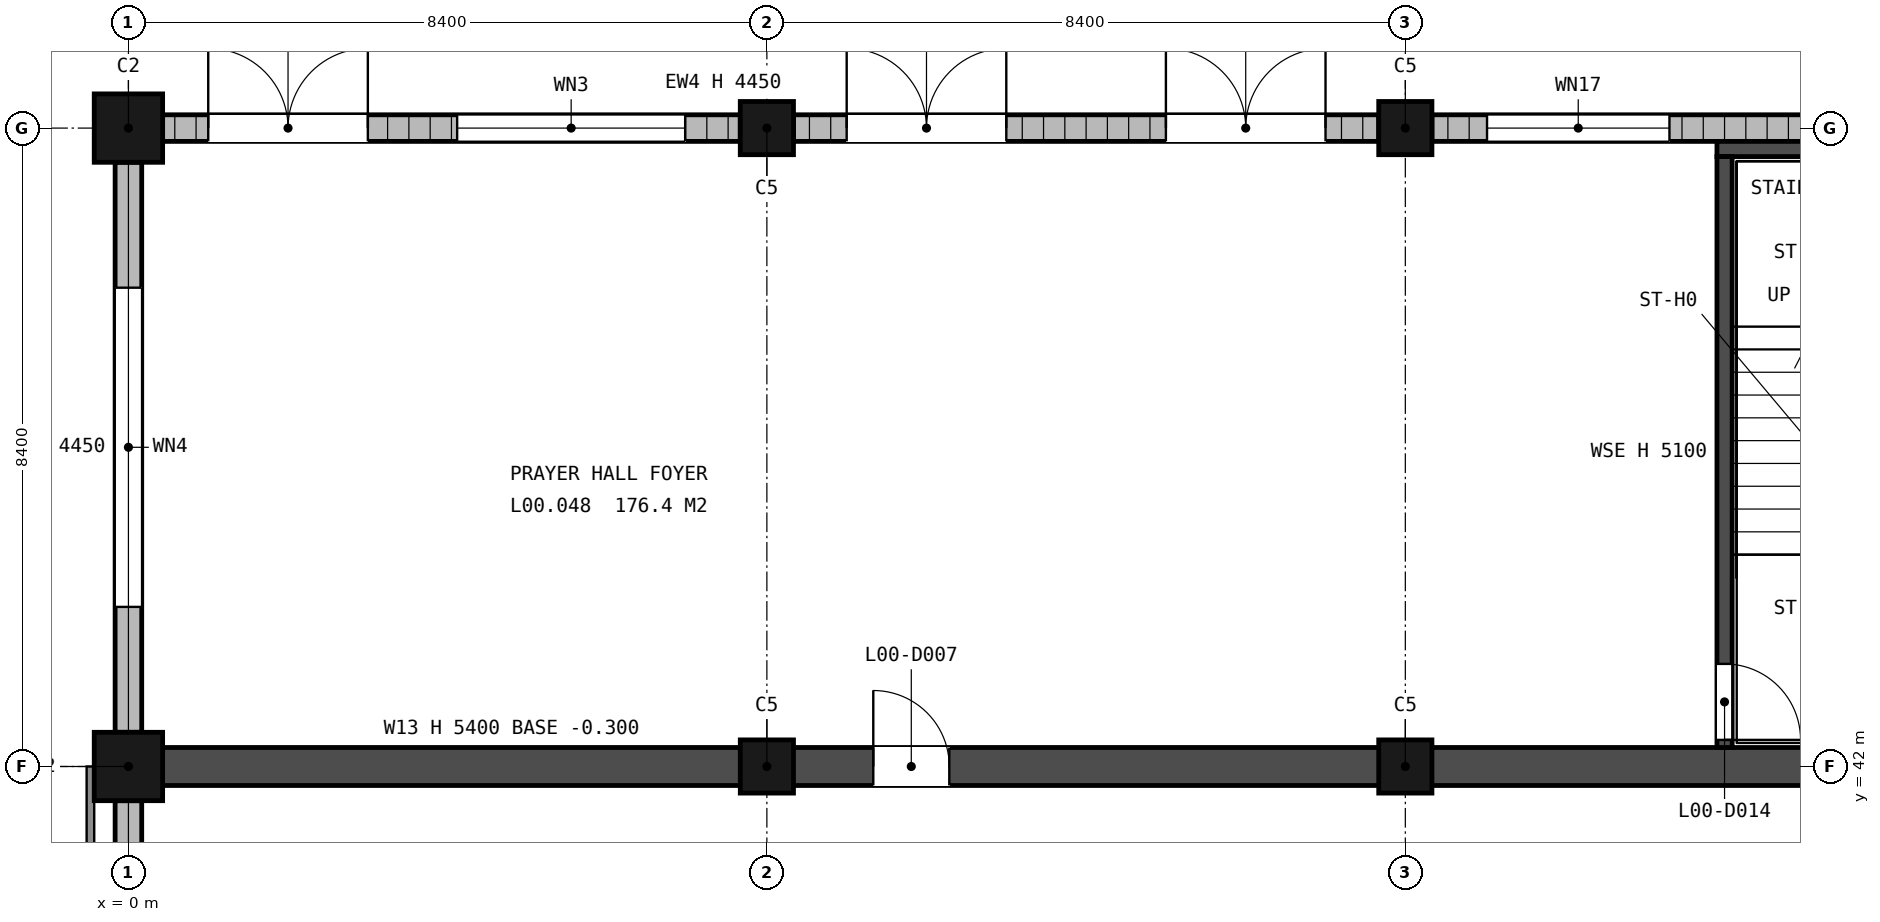
"""IFC4 building model, lengths in metres.
Left out: names, types, materials, properties, quantities, classifications, styles, units other than length and angle.
Written with IfcOpenShell. Run it as: python <this file> out.ifc"""

import sys

from ifc_helpers import new_model, si_unit, direction, frame, frame_2d, origin, origin_2d, place, context, subcontext, project, spatial, rectangle, extrude, element, fill, save


model = new_model("IFC4")
c1 = context("Model", 3, precision=1e-05, world=origin(), true_north=direction((0.0, 1.0)))
c2 = subcontext(c1, "Body", "Model", "MODEL_VIEW")
j1 = project(units=[si_unit("LENGTHUNIT", "METRE"), si_unit("PLANEANGLEUNIT", "RADIAN")], contexts=[c1])
p1 = place(None, origin())
s1 = spatial("IfcSite", under=j1, at=p1, CompositionType="ELEMENT")
p2 = place(p1, origin())
s2 = spatial("IfcBuilding", under=s1, at=p2, CompositionType="ELEMENT")
p3 = place(p2, origin())
s3 = spatial("IfcBuildingStorey", under=s2, at=p3, CompositionType="ELEMENT", Elevation=0.0)
for number, where, z_axis, x_axis in (
    (1, (0.0, 42.0, -0.3), (0.0, 0.0, 1.0), (1.0, 0.0, 0.0)),
    (2, (0.0, 50.4, -0.3), (0.0, 0.0, 1.0), (1.0, 0.0, 0.0)),
):
    element("IfcColumn", number, at=place(p3, frame(where, z_axis=z_axis, x_axis=x_axis)), inside=s3, PredefinedType="COLUMN", context=c2, shape_type="SweptSolid", body=[
        extrude(rectangle(XDim=0.9, YDim=0.9, at=origin_2d()), origin(), (0.0, 0.0, 1.0), 5.4),
    ])
for number, where, z_axis, x_axis in (
    (3, (8.4, 42.0, -0.3), (0.0, 0.0, 1.0), (1.0, 0.0, 0.0)),
    (4, (8.4, 50.4, -0.3), (0.0, 0.0, 1.0), (1.0, 0.0, 0.0)),
    (5, (16.8, 42.0, -0.3), (0.0, 0.0, 1.0), (1.0, 0.0, 0.0)),
    (6, (16.8, 50.4, -0.3), (0.0, 0.0, 1.0), (1.0, 0.0, 0.0)),
):
    element("IfcColumn", number, at=place(p3, frame(where, z_axis=z_axis, x_axis=x_axis)), inside=s3, PredefinedType="COLUMN", context=c2, shape_type="SweptSolid", body=[
        extrude(rectangle(XDim=0.7, YDim=0.7, at=origin_2d()), origin(), (0.0, 0.0, 1.0), 5.4),
    ])
p4 = place(p3, frame((0.0, 42.0, -0.3), z_axis=(0.0, 0.0, 1.0), x_axis=(1.0, 0.0, 0.0)))
e7 = element("IfcWall", 7, at=p4, inside=s3, PredefinedType="SHEAR", context=c2, shape_type="SweptSolid", body=[
    extrude(rectangle(XDim=25.2, YDim=0.5, at=frame_2d((12.6, 0.0))), origin(), (0.0, 0.0, 1.0), 5.4),
])
p5 = place(p4, frame((9.8, 0.0, 0.3)))
e8 = element("IfcOpeningElement", 8, at=p5, cuts=e7, PredefinedType="OPENING", context=c2, shape_type="SweptSolid", body=[
    extrude(rectangle(XDim=1.0, YDim=2.1, at=frame_2d((0.5, 1.05))), frame((0.0, 0.26, 0.0), z_axis=(0.0, -1.0, 0.0), x_axis=(1.0, 0.0, 0.0)), (0.0, 0.0, 1.0), 0.52),
])
p6 = place(p4, frame((22.8, 0.0, 0.3)))
e9 = element("IfcOpeningElement", 9, at=p6, cuts=e7, PredefinedType="OPENING", context=c2, shape_type="SweptSolid", body=[
    extrude(rectangle(XDim=1.0, YDim=2.1, at=frame_2d((0.5, 1.05))), frame((0.0, 0.26, 0.0), z_axis=(0.0, -1.0, 0.0), x_axis=(1.0, 0.0, 0.0)), (0.0, 0.0, 1.0), 0.52),
])
p7 = place(p3, frame((0.45, 50.4, 0.0), z_axis=(0.0, 0.0, 1.0), x_axis=(1.0, 0.0, 0.0)))
e10 = element("IfcWall", 10, at=p7, inside=s3, PredefinedType="STANDARD", context=c2, shape_type="SweptSolid", body=[
    extrude(rectangle(XDim=7.6, YDim=0.35, at=frame_2d((3.8, 0.0))), origin(), (0.0, 0.0, 1.0), 4.45),
])
p8 = place(p7, frame((0.6, 0.0, 0.0)))
e11 = element("IfcOpeningElement", 11, at=p8, cuts=e10, PredefinedType="OPENING", context=c2, shape_type="SweptSolid", body=[
    extrude(rectangle(XDim=2.1, YDim=2.2, at=frame_2d((1.05, 1.1))), frame((0.0, 0.185, 0.0), z_axis=(0.0, -1.0, 0.0), x_axis=(1.0, 0.0, 0.0)), (0.0, 0.0, 1.0), 0.37),
])
p9 = place(p7, frame((3.875, 0.0, 0.9)))
e12 = element("IfcOpeningElement", 12, at=p9, cuts=e10, PredefinedType="OPENING", context=c2, shape_type="SweptSolid", body=[
    extrude(rectangle(XDim=3.0, YDim=1.5, at=frame_2d((1.5, 0.75))), frame((0.0, 0.185, 0.0), z_axis=(0.0, -1.0, 0.0), x_axis=(1.0, 0.0, 0.0)), (0.0, 0.0, 1.0), 0.37),
])
p10 = place(p3, frame((8.75, 50.4, 0.0), z_axis=(0.0, 0.0, 1.0), x_axis=(1.0, 0.0, 0.0)))
e13 = element("IfcWall", 13, at=p10, inside=s3, PredefinedType="STANDARD", context=c2, shape_type="SweptSolid", body=[
    extrude(rectangle(XDim=7.7, YDim=0.35, at=frame_2d((3.85, 0.0))), origin(), (0.0, 0.0, 1.0), 4.45),
])
p11 = place(p10, frame((0.7, 0.0, 0.0)))
e14 = element("IfcOpeningElement", 14, at=p11, cuts=e13, PredefinedType="OPENING", context=c2, shape_type="SweptSolid", body=[
    extrude(rectangle(XDim=2.1, YDim=2.2, at=frame_2d((1.05, 1.1))), frame((0.0, 0.185, 0.0), z_axis=(0.0, -1.0, 0.0), x_axis=(1.0, 0.0, 0.0)), (0.0, 0.0, 1.0), 0.37),
])
p12 = place(p10, frame((4.9, 0.0, 0.0)))
e15 = element("IfcOpeningElement", 15, at=p12, cuts=e13, PredefinedType="OPENING", context=c2, shape_type="SweptSolid", body=[
    extrude(rectangle(XDim=2.1, YDim=2.2, at=frame_2d((1.05, 1.1))), frame((0.0, 0.185, 0.0), z_axis=(0.0, -1.0, 0.0), x_axis=(1.0, 0.0, 0.0)), (0.0, 0.0, 1.0), 0.37),
])
p13 = place(p3, frame((17.15, 50.4, 0.0), z_axis=(0.0, 0.0, 1.0), x_axis=(1.0, 0.0, 0.0)))
e16 = element("IfcWall", 16, at=p13, inside=s3, PredefinedType="STANDARD", context=c2, shape_type="SweptSolid", body=[
    extrude(rectangle(XDim=16.1, YDim=0.35, at=frame_2d((8.05, 0.0))), origin(), (0.0, 0.0, 1.0), 5.1),
])
p14 = place(p13, frame((9.1, 0.0, 0.0)))
e17 = element("IfcOpeningElement", 17, at=p14, cuts=e16, PredefinedType="OPENING", context=c2, shape_type="SweptSolid", body=[
    extrude(rectangle(XDim=2.1, YDim=2.2, at=frame_2d((1.05, 1.1))), frame((0.0, 0.185, 0.0), z_axis=(0.0, -1.0, 0.0), x_axis=(1.0, 0.0, 0.0)), (0.0, 0.0, 1.0), 0.37),
])
p15 = place(p13, frame((13.3, 0.0, 0.0)))
e18 = element("IfcOpeningElement", 18, at=p15, cuts=e16, PredefinedType="OPENING", context=c2, shape_type="SweptSolid", body=[
    extrude(rectangle(XDim=2.1, YDim=2.2, at=frame_2d((1.05, 1.1))), frame((0.0, 0.185, 0.0), z_axis=(0.0, -1.0, 0.0), x_axis=(1.0, 0.0, 0.0)), (0.0, 0.0, 1.0), 0.37),
])
p16 = place(p13, frame((0.725, 0.0, 0.9)))
e19 = element("IfcOpeningElement", 19, at=p16, cuts=e16, PredefinedType="OPENING", context=c2, shape_type="SweptSolid", body=[
    extrude(rectangle(XDim=2.4, YDim=1.5, at=frame_2d((1.2, 0.75))), frame((0.0, 0.185, 0.0), z_axis=(0.0, -1.0, 0.0), x_axis=(1.0, 0.0, 0.0)), (0.0, 0.0, 1.0), 0.37),
])
p17 = place(p3, frame((0.0, 38.15, 0.0), z_axis=(0.0, 0.0, 1.0), x_axis=(0.0, 1.0, 0.0)))
e20 = element("IfcWall", 20, at=p17, inside=s3, PredefinedType="STANDARD", context=c2, shape_type="SweptSolid", body=[
    extrude(rectangle(XDim=3.4, YDim=0.35, at=frame_2d((1.7, 0.0))), origin(), (0.0, 0.0, 1.0), 5.1),
])
p18 = place(p3, frame((0.0, 42.45, 0.0), z_axis=(0.0, 0.0, 1.0), x_axis=(0.0, 1.0, 0.0)))
e21 = element("IfcWall", 21, at=p18, inside=s3, PredefinedType="STANDARD", context=c2, shape_type="SweptSolid", body=[
    extrude(rectangle(XDim=7.5, YDim=0.35, at=frame_2d((3.75, 0.0))), origin(), (0.0, 0.0, 1.0), 4.45),
])
p19 = place(p18, frame((1.65, 0.0, 0.9)))
e22 = element("IfcOpeningElement", 22, at=p19, cuts=e21, PredefinedType="OPENING", context=c2, shape_type="SweptSolid", body=[
    extrude(rectangle(XDim=4.2, YDim=1.5, at=frame_2d((2.1, 0.75))), frame((0.0, 0.185, 0.0), z_axis=(0.0, -1.0, 0.0), x_axis=(1.0, 0.0, 0.0)), (0.0, 0.0, 1.0), 0.37),
])
p20 = place(p3, frame((20.9, 50.125, 0.0), z_axis=(0.0, 0.0, 1.0), x_axis=(1.0, 0.0, 0.0)))
e23 = element("IfcWall", 23, at=p20, inside=s3, PredefinedType="SHEAR", context=c2, shape_type="SweptSolid", body=[
    extrude(rectangle(XDim=4.4, YDim=0.2, at=frame_2d((2.2, 0.0))), origin(), (0.0, 0.0, 1.0), 5.1),
])
p21 = place(p3, frame((21.0, 42.25, 0.0), z_axis=(0.0, 0.0, 1.0), x_axis=(0.0, 1.0, 0.0)))
e24 = element("IfcWall", 24, at=p21, inside=s3, PredefinedType="SHEAR", context=c2, shape_type="SweptSolid", body=[
    extrude(rectangle(XDim=7.775, YDim=0.2, at=frame_2d((3.887, 0.0))), origin(), (0.0, 0.0, 1.0), 5.1),
])
p22 = place(p21, frame((0.1, 0.0, 0.0)))
e25 = element("IfcOpeningElement", 25, at=p22, cuts=e24, PredefinedType="OPENING", context=c2, shape_type="SweptSolid", body=[
    extrude(rectangle(XDim=1.0, YDim=2.1, at=frame_2d((0.5, 1.05))), frame((0.0, 0.11, 0.0), z_axis=(0.0, -1.0, 0.0), x_axis=(1.0, 0.0, 0.0)), (0.0, 0.0, 1.0), 0.22),
])
p23 = place(p8, origin())
e26 = element("IfcDoor", 26, at=p23, inside=s3, OperationType="SINGLE_SWING_LEFT", PredefinedType="DOOR", context=c2, shape_type="SweptSolid", body=[
    extrude(rectangle(XDim=2.1, YDim=0.013, at=frame_2d((1.05, 0.007))), frame((0.0, 0.115, 0.0), z_axis=(0.0, -1.0, 0.0), x_axis=(1.0, 0.0, 0.0)), (0.0, 0.0, 1.0), 0.23),
    extrude(rectangle(XDim=0.075, YDim=2.112, at=frame_2d((0.038, 1.069))), frame((0.0, 0.125, 0.0), z_axis=(0.0, -1.0, 0.0), x_axis=(1.0, 0.0, 0.0)), (0.0, 0.0, 1.0), 0.25),
    extrude(rectangle(XDim=0.075, YDim=2.112, at=frame_2d((2.062, 1.069))), frame((0.0, 0.125, 0.0), z_axis=(0.0, -1.0, 0.0), x_axis=(1.0, 0.0, 0.0)), (0.0, 0.0, 1.0), 0.25),
    extrude(rectangle(XDim=2.1, YDim=0.075, at=frame_2d((1.05, 2.163))), frame((0.0, 0.115, 0.0), z_axis=(0.0, -1.0, 0.0), x_axis=(1.0, 0.0, 0.0)), (0.0, 0.0, 1.0), 0.23),
    extrude(rectangle(XDim=1.95, YDim=0.3, at=frame_2d((1.05, 0.163))), frame((0.0, 0.02, 0.0), z_axis=(0.0, -1.0, 0.0), x_axis=(1.0, 0.0, 0.0)), (0.0, 0.0, 1.0), 0.04),
    extrude(rectangle(XDim=1.95, YDim=0.12, at=frame_2d((1.05, 2.065))), frame((0.0, 0.02, 0.0), z_axis=(0.0, -1.0, 0.0), x_axis=(1.0, 0.0, 0.0)), (0.0, 0.0, 1.0), 0.04),
    extrude(rectangle(XDim=0.09, YDim=1.692, at=frame_2d((0.12, 1.159))), frame((0.0, 0.025, 0.0), z_axis=(0.0, -1.0, 0.0), x_axis=(1.0, 0.0, 0.0)), (0.0, 0.0, 1.0), 0.05),
    extrude(rectangle(XDim=0.18, YDim=1.692, at=frame_2d((1.05, 1.159))), frame((0.0, 0.025, 0.0), z_axis=(0.0, -1.0, 0.0), x_axis=(1.0, 0.0, 0.0)), (0.0, 0.0, 1.0), 0.05),
    extrude(rectangle(XDim=0.09, YDim=1.692, at=frame_2d((1.98, 1.159))), frame((0.0, 0.025, 0.0), z_axis=(0.0, -1.0, 0.0), x_axis=(1.0, 0.0, 0.0)), (0.0, 0.0, 1.0), 0.05),
    extrude(rectangle(XDim=0.795, YDim=1.692, at=frame_2d((0.562, 1.159))), frame((0.0, 0.012, 0.0), z_axis=(0.0, -1.0, 0.0), x_axis=(1.0, 0.0, 0.0)), (0.0, 0.0, 1.0), 0.024),
    extrude(rectangle(XDim=0.795, YDim=1.692, at=frame_2d((1.538, 1.159))), frame((0.0, 0.012, 0.0), z_axis=(0.0, -1.0, 0.0), x_axis=(1.0, 0.0, 0.0)), (0.0, 0.0, 1.0), 0.024),
])
fill(e11, e26)
p24 = place(p9, origin())
e27 = element("IfcWindow", 27, at=p24, inside=s3, PartitioningType="SINGLE_PANEL", PredefinedType="WINDOW", context=c2, shape_type="SweptSolid", body=[
    extrude(rectangle(XDim=3.0, YDim=1.5, at=frame_2d((1.5, 0.75))), frame((0.0, 0.03, 0.0), z_axis=(0.0, -1.0, 0.0), x_axis=(1.0, 0.0, 0.0)), (0.0, 0.0, 1.0), 0.06),
])
fill(e12, e27)
p25 = place(p11, origin())
e28 = element("IfcDoor", 28, at=p25, inside=s3, OperationType="SINGLE_SWING_LEFT", PredefinedType="DOOR", context=c2, shape_type="SweptSolid", body=[
    extrude(rectangle(XDim=2.1, YDim=0.013, at=frame_2d((1.05, 0.007))), frame((0.0, 0.115, 0.0), z_axis=(0.0, -1.0, 0.0), x_axis=(1.0, 0.0, 0.0)), (0.0, 0.0, 1.0), 0.23),
    extrude(rectangle(XDim=0.075, YDim=2.112, at=frame_2d((0.038, 1.069))), frame((0.0, 0.125, 0.0), z_axis=(0.0, -1.0, 0.0), x_axis=(1.0, 0.0, 0.0)), (0.0, 0.0, 1.0), 0.25),
    extrude(rectangle(XDim=0.075, YDim=2.112, at=frame_2d((2.062, 1.069))), frame((0.0, 0.125, 0.0), z_axis=(0.0, -1.0, 0.0), x_axis=(1.0, 0.0, 0.0)), (0.0, 0.0, 1.0), 0.25),
    extrude(rectangle(XDim=2.1, YDim=0.075, at=frame_2d((1.05, 2.163))), frame((0.0, 0.115, 0.0), z_axis=(0.0, -1.0, 0.0), x_axis=(1.0, 0.0, 0.0)), (0.0, 0.0, 1.0), 0.23),
    extrude(rectangle(XDim=1.95, YDim=0.3, at=frame_2d((1.05, 0.163))), frame((0.0, 0.02, 0.0), z_axis=(0.0, -1.0, 0.0), x_axis=(1.0, 0.0, 0.0)), (0.0, 0.0, 1.0), 0.04),
    extrude(rectangle(XDim=1.95, YDim=0.12, at=frame_2d((1.05, 2.065))), frame((0.0, 0.02, 0.0), z_axis=(0.0, -1.0, 0.0), x_axis=(1.0, 0.0, 0.0)), (0.0, 0.0, 1.0), 0.04),
    extrude(rectangle(XDim=0.09, YDim=1.692, at=frame_2d((0.12, 1.159))), frame((0.0, 0.025, 0.0), z_axis=(0.0, -1.0, 0.0), x_axis=(1.0, 0.0, 0.0)), (0.0, 0.0, 1.0), 0.05),
    extrude(rectangle(XDim=0.18, YDim=1.692, at=frame_2d((1.05, 1.159))), frame((0.0, 0.025, 0.0), z_axis=(0.0, -1.0, 0.0), x_axis=(1.0, 0.0, 0.0)), (0.0, 0.0, 1.0), 0.05),
    extrude(rectangle(XDim=0.09, YDim=1.692, at=frame_2d((1.98, 1.159))), frame((0.0, 0.025, 0.0), z_axis=(0.0, -1.0, 0.0), x_axis=(1.0, 0.0, 0.0)), (0.0, 0.0, 1.0), 0.05),
    extrude(rectangle(XDim=0.795, YDim=1.692, at=frame_2d((0.562, 1.159))), frame((0.0, 0.012, 0.0), z_axis=(0.0, -1.0, 0.0), x_axis=(1.0, 0.0, 0.0)), (0.0, 0.0, 1.0), 0.024),
    extrude(rectangle(XDim=0.795, YDim=1.692, at=frame_2d((1.538, 1.159))), frame((0.0, 0.012, 0.0), z_axis=(0.0, -1.0, 0.0), x_axis=(1.0, 0.0, 0.0)), (0.0, 0.0, 1.0), 0.024),
])
fill(e14, e28)
p26 = place(p12, origin())
e29 = element("IfcDoor", 29, at=p26, inside=s3, OperationType="SINGLE_SWING_LEFT", PredefinedType="DOOR", context=c2, shape_type="SweptSolid", body=[
    extrude(rectangle(XDim=2.1, YDim=0.013, at=frame_2d((1.05, 0.007))), frame((0.0, 0.115, 0.0), z_axis=(0.0, -1.0, 0.0), x_axis=(1.0, 0.0, 0.0)), (0.0, 0.0, 1.0), 0.23),
    extrude(rectangle(XDim=0.075, YDim=2.112, at=frame_2d((0.038, 1.069))), frame((0.0, 0.125, 0.0), z_axis=(0.0, -1.0, 0.0), x_axis=(1.0, 0.0, 0.0)), (0.0, 0.0, 1.0), 0.25),
    extrude(rectangle(XDim=0.075, YDim=2.112, at=frame_2d((2.062, 1.069))), frame((0.0, 0.125, 0.0), z_axis=(0.0, -1.0, 0.0), x_axis=(1.0, 0.0, 0.0)), (0.0, 0.0, 1.0), 0.25),
    extrude(rectangle(XDim=2.1, YDim=0.075, at=frame_2d((1.05, 2.163))), frame((0.0, 0.115, 0.0), z_axis=(0.0, -1.0, 0.0), x_axis=(1.0, 0.0, 0.0)), (0.0, 0.0, 1.0), 0.23),
    extrude(rectangle(XDim=1.95, YDim=0.3, at=frame_2d((1.05, 0.163))), frame((0.0, 0.02, 0.0), z_axis=(0.0, -1.0, 0.0), x_axis=(1.0, 0.0, 0.0)), (0.0, 0.0, 1.0), 0.04),
    extrude(rectangle(XDim=1.95, YDim=0.12, at=frame_2d((1.05, 2.065))), frame((0.0, 0.02, 0.0), z_axis=(0.0, -1.0, 0.0), x_axis=(1.0, 0.0, 0.0)), (0.0, 0.0, 1.0), 0.04),
    extrude(rectangle(XDim=0.09, YDim=1.692, at=frame_2d((0.12, 1.159))), frame((0.0, 0.025, 0.0), z_axis=(0.0, -1.0, 0.0), x_axis=(1.0, 0.0, 0.0)), (0.0, 0.0, 1.0), 0.05),
    extrude(rectangle(XDim=0.18, YDim=1.692, at=frame_2d((1.05, 1.159))), frame((0.0, 0.025, 0.0), z_axis=(0.0, -1.0, 0.0), x_axis=(1.0, 0.0, 0.0)), (0.0, 0.0, 1.0), 0.05),
    extrude(rectangle(XDim=0.09, YDim=1.692, at=frame_2d((1.98, 1.159))), frame((0.0, 0.025, 0.0), z_axis=(0.0, -1.0, 0.0), x_axis=(1.0, 0.0, 0.0)), (0.0, 0.0, 1.0), 0.05),
    extrude(rectangle(XDim=0.795, YDim=1.692, at=frame_2d((0.562, 1.159))), frame((0.0, 0.012, 0.0), z_axis=(0.0, -1.0, 0.0), x_axis=(1.0, 0.0, 0.0)), (0.0, 0.0, 1.0), 0.024),
    extrude(rectangle(XDim=0.795, YDim=1.692, at=frame_2d((1.538, 1.159))), frame((0.0, 0.012, 0.0), z_axis=(0.0, -1.0, 0.0), x_axis=(1.0, 0.0, 0.0)), (0.0, 0.0, 1.0), 0.024),
])
fill(e15, e29)
p27 = place(p16, origin())
e30 = element("IfcWindow", 30, at=p27, inside=s3, PartitioningType="SINGLE_PANEL", PredefinedType="WINDOW", context=c2, shape_type="SweptSolid", body=[
    extrude(rectangle(XDim=2.4, YDim=1.5, at=frame_2d((1.2, 0.75))), frame((0.0, 0.03, 0.0), z_axis=(0.0, -1.0, 0.0), x_axis=(1.0, 0.0, 0.0)), (0.0, 0.0, 1.0), 0.06),
])
fill(e19, e30)
p28 = place(p19, origin())
e31 = element("IfcWindow", 31, at=p28, inside=s3, PartitioningType="SINGLE_PANEL", PredefinedType="WINDOW", context=c2, shape_type="SweptSolid", body=[
    extrude(rectangle(XDim=4.2, YDim=1.5, at=frame_2d((2.1, 0.75))), frame((0.0, 0.03, 0.0), z_axis=(0.0, -1.0, 0.0), x_axis=(1.0, 0.0, 0.0)), (0.0, 0.0, 1.0), 0.06),
])
fill(e22, e31)
p29 = place(p22, origin())
e32 = element("IfcDoor", 32, at=p29, inside=s3, OperationType="SINGLE_SWING_LEFT", PredefinedType="DOOR", context=c2, shape_type="SweptSolid", body=[
    extrude(rectangle(XDim=1.0, YDim=2.1, at=frame_2d((0.5, 1.05))), frame((0.0, 0.025, 0.0), z_axis=(0.0, -1.0, 0.0), x_axis=(1.0, 0.0, 0.0)), (0.0, 0.0, 1.0), 0.05),
])
fill(e25, e32)
p30 = place(p5, origin())
e33 = element("IfcDoor", 33, at=p30, inside=s3, OperationType="SINGLE_SWING_RIGHT", PredefinedType="DOOR", context=c2, shape_type="SweptSolid", body=[
    extrude(rectangle(XDim=1.0, YDim=2.1, at=frame_2d((0.5, 1.05))), frame((0.0, 0.025, 0.0), z_axis=(0.0, -1.0, 0.0), x_axis=(1.0, 0.0, 0.0)), (0.0, 0.0, 1.0), 0.05),
])
fill(e8, e33)
save(model, sys.argv[1])
